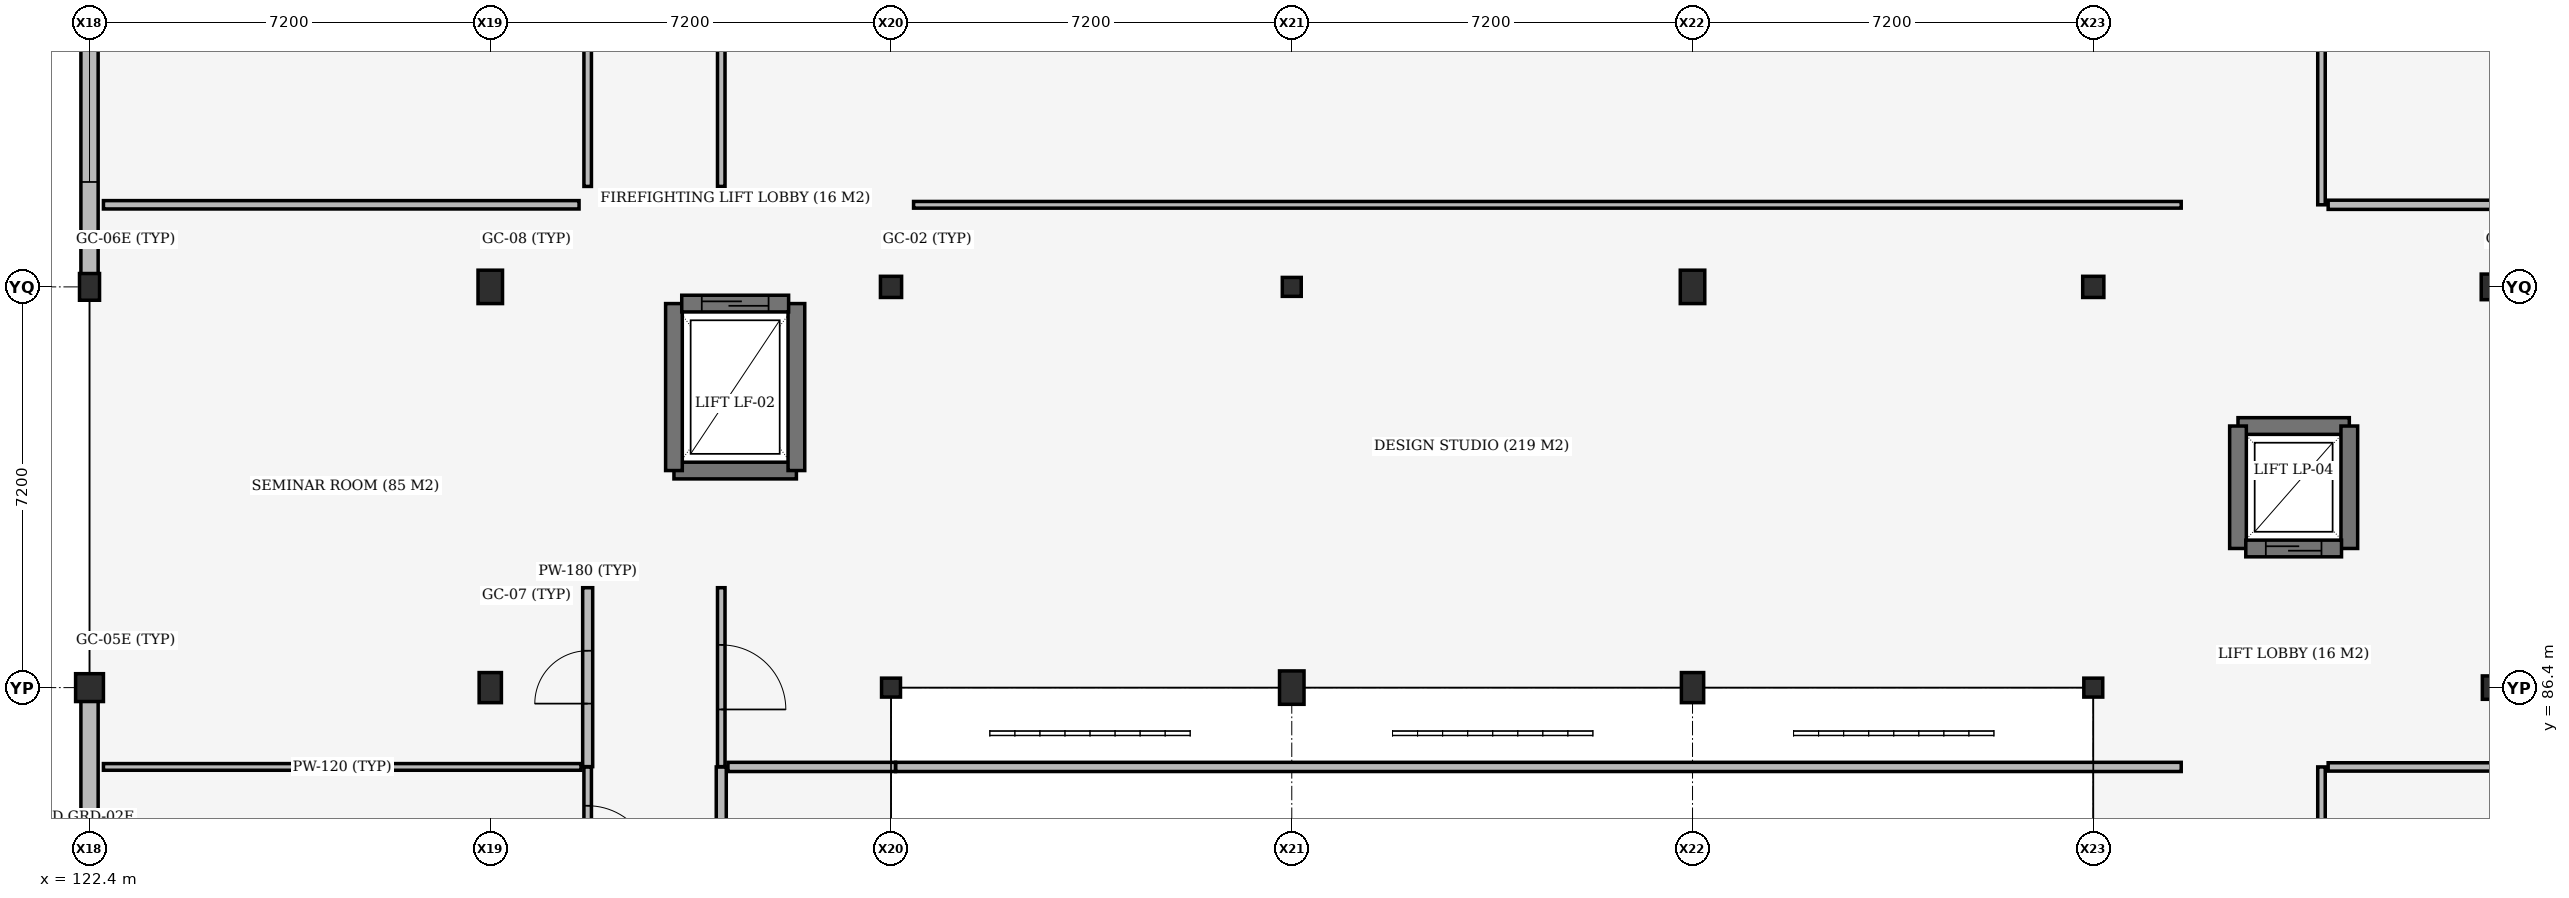
"""IFC4 building model, lengths in metres.
Left out: names, types, materials, properties, quantities, classifications, styles, units other than length and angle.
Written with IfcOpenShell. Run it as: python <this file> out.ifc"""

import sys

from ifc_helpers import new_model, si_unit, direction, frame, frame_2d, origin, origin_2d, place, context, subcontext, project, spatial, rectangle, extrude, element, fill, save


model = new_model("IFC4")
c1 = context("Model", 3, precision=1e-05, world=origin(), true_north=direction((0.0, 1.0)))
c2 = subcontext(c1, "Body", "Model", "MODEL_VIEW")
j1 = project(units=[si_unit("LENGTHUNIT", "METRE"), si_unit("PLANEANGLEUNIT", "RADIAN")], contexts=[c1])
p1 = place(None, origin())
s1 = spatial("IfcSite", under=j1, at=p1, CompositionType="ELEMENT")
p2 = place(p1, origin())
s2 = spatial("IfcBuilding", under=s1, at=p2, CompositionType="ELEMENT")
p3 = place(p2, frame((0.0, 0.0, 9.6)))
s3 = spatial("IfcBuildingStorey", under=s2, at=p3, CompositionType="ELEMENT", Elevation=9.6)
p4 = place(p3, frame((122.4, 86.4, 0.0), z_axis=(0.0, 0.0, 1.0), x_axis=(1.0, 0.0, 0.0)))
e1 = element("IfcColumn", 1, at=p4, inside=s3, PredefinedType="COLUMN", context=c2, shape_type="SweptSolid", body=[
    extrude(rectangle(XDim=0.5, YDim=0.5, at=origin_2d()), origin(), (0.0, 0.0, 1.0), 3.92),
])
p5 = place(p3, frame((122.4, 93.6, 0.0), z_axis=(0.0, 0.0, 1.0), x_axis=(1.0, 0.0, 0.0)))
e2 = element("IfcColumn", 2, at=p5, inside=s3, PredefinedType="COLUMN", context=c2, shape_type="SweptSolid", body=[
    extrude(rectangle(XDim=0.36, YDim=0.48, at=origin_2d()), origin(), (0.0, 0.0, 1.0), 3.92),
])
p6 = place(p3, frame((129.6, 86.4, 0.0), z_axis=(0.0, 0.0, 1.0), x_axis=(1.0, 0.0, 0.0)))
e3 = element("IfcColumn", 3, at=p6, inside=s3, PredefinedType="COLUMN", context=c2, shape_type="SweptSolid", body=[
    extrude(rectangle(XDim=0.4, YDim=0.54, at=origin_2d()), origin(), (0.0, 0.0, 1.0), 3.92),
])
p7 = place(p3, frame((129.6, 93.6, 0.0), z_axis=(0.0, 0.0, 1.0), x_axis=(1.0, 0.0, 0.0)))
e4 = element("IfcColumn", 4, at=p7, inside=s3, PredefinedType="COLUMN", context=c2, shape_type="SweptSolid", body=[
    extrude(rectangle(XDim=0.44, YDim=0.6, at=origin_2d()), origin(), (0.0, 0.0, 1.0), 3.92),
])
p8 = place(p3, frame((136.8, 86.4, 0.0), z_axis=(0.0, 0.0, 1.0), x_axis=(1.0, 0.0, 0.0)))
e5 = element("IfcColumn", 5, at=p8, inside=s3, PredefinedType="COLUMN", context=c2, shape_type="SweptSolid", body=[
    extrude(rectangle(XDim=0.34, YDim=0.34, at=origin_2d()), origin(), (0.0, 0.0, 1.0), 3.92),
])
p9 = place(p3, frame((136.8, 93.6, 0.0), z_axis=(0.0, 0.0, 1.0), x_axis=(1.0, 0.0, 0.0)))
e6 = element("IfcColumn", 6, at=p9, inside=s3, PredefinedType="COLUMN", context=c2, shape_type="SweptSolid", body=[
    extrude(rectangle(XDim=0.38, YDim=0.38, at=origin_2d()), origin(), (0.0, 0.0, 1.0), 3.92),
])
p10 = place(p3, frame((144.0, 86.4, 0.0), z_axis=(0.0, 0.0, 1.0), x_axis=(1.0, 0.0, 0.0)))
e7 = element("IfcColumn", 7, at=p10, inside=s3, PredefinedType="COLUMN", context=c2, shape_type="SweptSolid", body=[
    extrude(rectangle(XDim=0.44, YDim=0.6, at=origin_2d()), origin(), (0.0, 0.0, 1.0), 3.92),
])
p11 = place(p3, frame((144.0, 93.6, 0.0), z_axis=(0.0, 0.0, 1.0), x_axis=(1.0, 0.0, 0.0)))
e8 = element("IfcColumn", 8, at=p11, inside=s3, PredefinedType="COLUMN", context=c2, shape_type="SweptSolid", body=[
    extrude(rectangle(XDim=0.34, YDim=0.34, at=origin_2d()), origin(), (0.0, 0.0, 1.0), 3.92),
])
p12 = place(p3, frame((151.2, 86.4, 0.0), z_axis=(0.0, 0.0, 1.0), x_axis=(1.0, 0.0, 0.0)))
e9 = element("IfcColumn", 9, at=p12, inside=s3, PredefinedType="COLUMN", context=c2, shape_type="SweptSolid", body=[
    extrude(rectangle(XDim=0.4, YDim=0.54, at=origin_2d()), origin(), (0.0, 0.0, 1.0), 3.92),
])
p13 = place(p3, frame((151.2, 93.6, 0.0), z_axis=(0.0, 0.0, 1.0), x_axis=(1.0, 0.0, 0.0)))
e10 = element("IfcColumn", 10, at=p13, inside=s3, PredefinedType="COLUMN", context=c2, shape_type="SweptSolid", body=[
    extrude(rectangle(XDim=0.44, YDim=0.6, at=origin_2d()), origin(), (0.0, 0.0, 1.0), 3.92),
])
p14 = place(p3, frame((158.4, 86.4, 0.0), z_axis=(0.0, 0.0, 1.0), x_axis=(1.0, 0.0, 0.0)))
e11 = element("IfcColumn", 11, at=p14, inside=s3, PredefinedType="COLUMN", context=c2, shape_type="SweptSolid", body=[
    extrude(rectangle(XDim=0.34, YDim=0.34, at=origin_2d()), origin(), (0.0, 0.0, 1.0), 3.92),
])
p15 = place(p3, frame((158.4, 93.6, 0.0), z_axis=(0.0, 0.0, 1.0), x_axis=(1.0, 0.0, 0.0)))
e12 = element("IfcColumn", 12, at=p15, inside=s3, PredefinedType="COLUMN", context=c2, shape_type="SweptSolid", body=[
    extrude(rectangle(XDim=0.38, YDim=0.38, at=origin_2d()), origin(), (0.0, 0.0, 1.0), 3.92),
])
p16 = place(p3, frame((165.6, 86.4, 0.0), z_axis=(0.0, 0.0, 1.0), x_axis=(1.0, 0.0, 0.0)))
e13 = element("IfcColumn", 13, at=p16, inside=s3, PredefinedType="COLUMN", context=c2, shape_type="SweptSolid", body=[
    extrude(rectangle(XDim=0.42, YDim=0.42, at=origin_2d()), origin(), (0.0, 0.0, 1.0), 3.92),
])
p17 = place(p3, frame((165.6, 93.6, 0.0), z_axis=(0.0, 0.0, 1.0), x_axis=(1.0, 0.0, 0.0)))
e14 = element("IfcColumn", 14, at=p17, inside=s3, PredefinedType="COLUMN", context=c2, shape_type="SweptSolid", body=[
    extrude(rectangle(XDim=0.46, YDim=0.46, at=origin_2d()), origin(), (0.0, 0.0, 1.0), 3.92),
])
p18 = place(p3, frame((132.9, 90.3, 0.0), z_axis=(0.0, 0.0, 1.0), x_axis=(1.0, 0.0, 0.0)))
e15 = element("IfcWall", 15, at=p18, inside=s3, PredefinedType="SHEAR", context=c2, shape_type="SweptSolid", body=[
    extrude(rectangle(XDim=2.2, YDim=0.3, at=frame_2d((1.1, 0.0))), origin(), (0.0, 0.0, 1.0), 3.92),
])
for number, where, z_axis, x_axis in (
    (16, (132.9, 93.3, 0.0), (0.0, 0.0, 1.0), (0.0, -1.0, 0.0)),
    (17, (135.1, 90.3, 0.0), (0.0, 0.0, 1.0), (0.0, 1.0, 0.0)),
):
    element("IfcWall", number, at=place(p3, frame(where, z_axis=z_axis, x_axis=x_axis)), inside=s3, PredefinedType="SHEAR", context=c2, shape_type="SweptSolid", body=[
        extrude(rectangle(XDim=3.0, YDim=0.3, at=frame_2d((1.5, 0.0))), origin(), (0.0, 0.0, 1.0), 3.92),
    ])
p19 = place(p3, frame((163.0, 91.1, 0.0), z_axis=(0.0, 0.0, 1.0), x_axis=(-1.0, 0.0, 0.0)))
e18 = element("IfcWall", 18, at=p19, inside=s3, PredefinedType="SHEAR", context=c2, shape_type="SweptSolid", body=[
    extrude(rectangle(XDim=2.0, YDim=0.3, at=frame_2d((1.0, 0.0))), origin(), (0.0, 0.0, 1.0), 3.92),
])
for number, where, z_axis, x_axis in (
    (19, (161.0, 91.1, 0.0), (0.0, 0.0, 1.0), (0.0, -1.0, 0.0)),
    (20, (163.0, 88.9, 0.0), (0.0, 0.0, 1.0), (0.0, 1.0, 0.0)),
):
    element("IfcWall", number, at=place(p3, frame(where, z_axis=z_axis, x_axis=x_axis)), inside=s3, PredefinedType="SHEAR", context=c2, shape_type="SweptSolid", body=[
        extrude(rectangle(XDim=2.2, YDim=0.3, at=frame_2d((1.1, 0.0))), origin(), (0.0, 0.0, 1.0), 3.92),
    ])
p20 = place(p3, frame((122.4, 83.022, 0.0), z_axis=(0.0, 0.0, 1.0), x_axis=(0.0, 1.0, 0.0)))
e21 = element("IfcWall", 21, at=p20, inside=s3, PredefinedType="STANDARD", context=c2, shape_type="SweptSolid", body=[
    extrude(rectangle(XDim=3.136, YDim=0.31, at=frame_2d((1.568, 0.0))), origin(), (0.0, 0.0, 1.0), 3.4),
])
p21 = place(p3, frame((122.4, 93.832, 0.0), z_axis=(0.0, 0.0, 1.0), x_axis=(0.0, 1.0, 0.0)))
e22 = element("IfcWall", 22, at=p21, inside=s3, PredefinedType="STANDARD", context=c2, shape_type="SweptSolid", body=[
    extrude(rectangle(XDim=6.706, YDim=0.31, at=frame_2d((3.353, 0.0))), origin(), (0.0, 0.0, 1.0), 3.28),
])
p22 = place(p21, frame((1.653, 0.0, 0.9)))
e23 = element("IfcOpeningElement", 23, at=p22, cuts=e22, PredefinedType="OPENING", context=c2, shape_type="SweptSolid", body=[
    extrude(rectangle(XDim=3.4, YDim=1.5, at=frame_2d((1.7, 0.75))), frame((0.0, 0.165, 0.0), z_axis=(0.0, -1.0, 0.0), x_axis=(1.0, 0.0, 0.0)), (0.0, 0.0, 1.0), 0.33),
])
p23 = place(p3, frame((133.04, 93.3, 0.0), z_axis=(0.0, 0.0, 1.0), x_axis=(1.0, 0.0, 0.0)))
e24 = element("IfcWall", 24, at=p23, inside=s3, PredefinedType="SHEAR", context=c2, shape_type="SweptSolid", body=[
    extrude(rectangle(XDim=1.92, YDim=0.3, at=frame_2d((0.96, 0.0))), origin(), (0.0, 0.0, 1.0), 3.92),
])
p24 = place(p23, frame((0.36, 0.0, 0.0)))
e25 = element("IfcOpeningElement", 25, at=p24, cuts=e24, PredefinedType="OPENING", context=c2, shape_type="SweptSolid", body=[
    extrude(rectangle(XDim=1.2, YDim=2.1, at=frame_2d((0.6, 1.05))), frame((0.0, 0.16, 0.0), z_axis=(0.0, -1.0, 0.0), x_axis=(1.0, 0.0, 0.0)), (0.0, 0.0, 1.0), 0.32),
])
p25 = place(p3, frame((162.86, 88.9, 0.0), z_axis=(0.0, 0.0, 1.0), x_axis=(-1.0, 0.0, 0.0)))
e26 = element("IfcWall", 26, at=p25, inside=s3, PredefinedType="SHEAR", context=c2, shape_type="SweptSolid", body=[
    extrude(rectangle(XDim=1.72, YDim=0.3, at=frame_2d((0.86, 0.0))), origin(), (0.0, 0.0, 1.0), 3.92),
])
p26 = place(p25, frame((0.36, 0.0, 0.0)))
e27 = element("IfcOpeningElement", 27, at=p26, cuts=e26, PredefinedType="OPENING", context=c2, shape_type="SweptSolid", body=[
    extrude(rectangle(XDim=1.0, YDim=2.1, at=frame_2d((0.5, 1.05))), frame((0.0, 0.16, 0.0), z_axis=(0.0, -1.0, 0.0), x_axis=(1.0, 0.0, 0.0)), (0.0, 0.0, 1.0), 0.32),
])
p27 = place(p3, frame((131.35, 82.42, 0.0), z_axis=(0.0, 0.0, 1.0), x_axis=(0.0, 1.0, 0.0)))
e28 = element("IfcWall", 28, at=p27, inside=s3, PredefinedType="PARTITIONING", context=c2, shape_type="SweptSolid", body=[
    extrude(rectangle(XDim=2.555, YDim=0.135, at=frame_2d((1.278, 0.0))), origin(), (0.0, 0.0, 1.0), 3.34),
])
p28 = place(p27, frame((0.698, 0.0, 0.0)))
e29 = element("IfcOpeningElement", 29, at=p28, cuts=e28, PredefinedType="OPENING", context=c2, shape_type="SweptSolid", body=[
    extrude(rectangle(XDim=1.16, YDim=2.2, at=frame_2d((0.58, 1.1))), frame((0.0, 0.077, 0.0), z_axis=(0.0, -1.0, 0.0), x_axis=(1.0, 0.0, 0.0)), (0.0, 0.0, 1.0), 0.155),
])
p29 = place(p3, frame((122.65, 84.975, 0.0), z_axis=(0.0, 0.0, 1.0), x_axis=(1.0, 0.0, 0.0)))
e30 = element("IfcWall", 30, at=p29, inside=s3, PredefinedType="PARTITIONING", context=c2, shape_type="SweptSolid", body=[
    extrude(rectangle(XDim=8.58, YDim=0.12, at=frame_2d((4.29, 0.0))), origin(), (0.0, 0.0, 1.0), 3.28),
])
p30 = place(p3, frame((131.35, 84.98, 0.0), z_axis=(0.0, 0.0, 1.0), x_axis=(0.0, 1.0, 0.0)))
e31 = element("IfcWall", 31, at=p30, inside=s3, PredefinedType="PARTITIONING", context=c2, shape_type="SweptSolid", body=[
    extrude(rectangle(XDim=3.215, YDim=0.18, at=frame_2d((1.607, 0.0))), origin(), (0.0, 0.0, 1.0), 3.4),
])
p31 = place(p30, frame((1.133, 0.0, 0.0)))
e32 = element("IfcOpeningElement", 32, at=p31, cuts=e31, PredefinedType="OPENING", context=c2, shape_type="SweptSolid", body=[
    extrude(rectangle(XDim=0.95, YDim=2.15, at=frame_2d((0.475, 1.075))), frame((0.0, 0.1, 0.0), z_axis=(0.0, -1.0, 0.0), x_axis=(1.0, 0.0, 0.0)), (0.0, 0.0, 1.0), 0.2),
])
p32 = place(p3, frame((122.65, 95.075, 0.0), z_axis=(0.0, 0.0, 1.0), x_axis=(1.0, 0.0, 0.0)))
e33 = element("IfcWall", 33, at=p32, inside=s3, PredefinedType="PARTITIONING", context=c2, shape_type="SweptSolid", body=[
    extrude(rectangle(XDim=8.545, YDim=0.15, at=frame_2d((4.272, 0.0))), origin(), (0.0, 0.0, 1.0), 3.18),
])
p33 = place(p3, frame((131.35, 95.405, 0.0), z_axis=(0.0, 0.0, 1.0), x_axis=(0.0, 1.0, 0.0)))
e34 = element("IfcWall", 34, at=p33, inside=s3, PredefinedType="PARTITIONING", context=c2, shape_type="SweptSolid", body=[
    extrude(rectangle(XDim=12.295, YDim=0.135, at=frame_2d((6.147, 0.0))), origin(), (0.0, 0.0, 1.0), 3.18),
])
p34 = place(p33, frame((5.567, 0.0, 0.0)))
e35 = element("IfcOpeningElement", 35, at=p34, cuts=e34, PredefinedType="OPENING", context=c2, shape_type="SweptSolid", body=[
    extrude(rectangle(XDim=1.16, YDim=2.2, at=frame_2d((0.58, 1.1))), frame((0.0, 0.077, 0.0), z_axis=(0.0, -1.0, 0.0), x_axis=(1.0, 0.0, 0.0)), (0.0, 0.0, 1.0), 0.155),
])
p35 = place(p3, frame((133.75, 74.055, 0.0), z_axis=(0.0, 0.0, 1.0), x_axis=(0.0, 1.0, 0.0)))
e36 = element("IfcWall", 36, at=p35, inside=s3, PredefinedType="PARTITIONING", context=c2, shape_type="SweptSolid", body=[
    extrude(rectangle(XDim=10.92, YDim=0.18, at=frame_2d((5.46, 0.0))), origin(), (0.0, 0.0, 1.0), 3.28),
])
p36 = place(p35, frame((4.985, 0.0, 0.0)))
e37 = element("IfcOpeningElement", 37, at=p36, cuts=e36, PredefinedType="OPENING", context=c2, shape_type="SweptSolid", body=[
    extrude(rectangle(XDim=0.95, YDim=2.15, at=frame_2d((0.475, 1.075))), frame((0.0, 0.1, 0.0), z_axis=(0.0, -1.0, 0.0), x_axis=(1.0, 0.0, 0.0)), (0.0, 0.0, 1.0), 0.2),
])
p37 = place(p3, frame((133.87, 84.975, 0.0), z_axis=(0.0, 0.0, 1.0), x_axis=(1.0, 0.0, 0.0)))
e38 = element("IfcWall", 38, at=p37, inside=s3, PredefinedType="PARTITIONING", context=c2, shape_type="SweptSolid", body=[
    extrude(rectangle(XDim=3.01, YDim=0.165, at=frame_2d((1.505, 0.0))), origin(), (0.0, 0.0, 1.0), 3.4),
])
p38 = place(p3, frame((133.75, 84.98, 0.0), z_axis=(0.0, 0.0, 1.0), x_axis=(0.0, 1.0, 0.0)))
e39 = element("IfcWall", 39, at=p38, inside=s3, PredefinedType="PARTITIONING", context=c2, shape_type="SweptSolid", body=[
    extrude(rectangle(XDim=3.215, YDim=0.135, at=frame_2d((1.607, 0.0))), origin(), (0.0, 0.0, 1.0), 3.4),
])
p39 = place(p38, frame((1.028, 0.0, 0.0)))
e40 = element("IfcOpeningElement", 40, at=p39, cuts=e39, PredefinedType="OPENING", context=c2, shape_type="SweptSolid", body=[
    extrude(rectangle(XDim=1.16, YDim=2.2, at=frame_2d((0.58, 1.1))), frame((0.0, 0.077, 0.0), z_axis=(0.0, -1.0, 0.0), x_axis=(1.0, 0.0, 0.0)), (0.0, 0.0, 1.0), 0.155),
])
p40 = place(p3, frame((136.885, 84.975, 0.0), z_axis=(0.0, 0.0, 1.0), x_axis=(1.0, 0.0, 0.0)))
e41 = element("IfcWall", 41, at=p40, inside=s3, PredefinedType="PARTITIONING", context=c2, shape_type="SweptSolid", body=[
    extrude(rectangle(XDim=23.095, YDim=0.165, at=frame_2d((11.547, 0.0))), origin(), (0.0, 0.0, 1.0), 3.34),
])
p41 = place(p3, frame((137.205, 95.075, 0.0), z_axis=(0.0, 0.0, 1.0), x_axis=(1.0, 0.0, 0.0)))
e42 = element("IfcWall", 42, at=p41, inside=s3, PredefinedType="PARTITIONING", context=c2, shape_type="SweptSolid", body=[
    extrude(rectangle(XDim=22.775, YDim=0.12, at=frame_2d((11.387, 0.0))), origin(), (0.0, 0.0, 1.0), 3.24),
])
p42 = place(p3, frame((133.75, 95.405, 0.0), z_axis=(0.0, 0.0, 1.0), x_axis=(0.0, 1.0, 0.0)))
e43 = element("IfcWall", 43, at=p42, inside=s3, PredefinedType="PARTITIONING", context=c2, shape_type="SweptSolid", body=[
    extrude(rectangle(XDim=12.295, YDim=0.135, at=frame_2d((6.147, 0.0))), origin(), (0.0, 0.0, 1.0), 3.18),
])
p43 = place(p42, frame((5.573, 0.0, 0.0)))
e44 = element("IfcOpeningElement", 44, at=p43, cuts=e43, PredefinedType="OPENING", context=c2, shape_type="SweptSolid", body=[
    extrude(rectangle(XDim=1.15, YDim=2.2, at=frame_2d((0.575, 1.1))), frame((0.0, 0.077, 0.0), z_axis=(0.0, -1.0, 0.0), x_axis=(1.0, 0.0, 0.0)), (0.0, 0.0, 1.0), 0.155),
])
p44 = place(p3, frame((162.5, 74.055, 0.0), z_axis=(0.0, 0.0, 1.0), x_axis=(0.0, 1.0, 0.0)))
e45 = element("IfcWall", 45, at=p44, inside=s3, PredefinedType="PARTITIONING", context=c2, shape_type="SweptSolid", body=[
    extrude(rectangle(XDim=10.92, YDim=0.135, at=frame_2d((5.46, 0.0))), origin(), (0.0, 0.0, 1.0), 3.24),
])
p45 = place(p44, frame((4.88, 0.0, 0.0)))
e46 = element("IfcOpeningElement", 46, at=p45, cuts=e45, PredefinedType="OPENING", context=c2, shape_type="SweptSolid", body=[
    extrude(rectangle(XDim=1.16, YDim=2.2, at=frame_2d((0.58, 1.1))), frame((0.0, 0.077, 0.0), z_axis=(0.0, -1.0, 0.0), x_axis=(1.0, 0.0, 0.0)), (0.0, 0.0, 1.0), 0.155),
])
p46 = place(p3, frame((162.62, 84.975, 0.0), z_axis=(0.0, 0.0, 1.0), x_axis=(1.0, 0.0, 0.0)))
e47 = element("IfcWall", 47, at=p46, inside=s3, PredefinedType="PARTITIONING", context=c2, shape_type="SweptSolid", body=[
    extrude(rectangle(XDim=9.93, YDim=0.15, at=frame_2d((4.965, 0.0))), origin(), (0.0, 0.0, 1.0), 3.24),
])
p47 = place(p3, frame((162.62, 95.075, 0.0), z_axis=(0.0, 0.0, 1.0), x_axis=(1.0, 0.0, 0.0)))
e48 = element("IfcWall", 48, at=p47, inside=s3, PredefinedType="PARTITIONING", context=c2, shape_type="SweptSolid", body=[
    extrude(rectangle(XDim=9.93, YDim=0.165, at=frame_2d((4.965, 0.0))), origin(), (0.0, 0.0, 1.0), 3.4),
])
p48 = place(p3, frame((162.5, 95.075, 0.0), z_axis=(0.0, 0.0, 1.0), x_axis=(0.0, 1.0, 0.0)))
e49 = element("IfcWall", 49, at=p48, inside=s3, PredefinedType="PARTITIONING", context=c2, shape_type="SweptSolid", body=[
    extrude(rectangle(XDim=12.625, YDim=0.135, at=frame_2d((6.312, 0.0))), origin(), (0.0, 0.0, 1.0), 3.24),
])
p49 = place(p48, frame((5.732, 0.0, 0.0)))
e50 = element("IfcOpeningElement", 50, at=p49, cuts=e49, PredefinedType="OPENING", context=c2, shape_type="SweptSolid", body=[
    extrude(rectangle(XDim=1.16, YDim=2.2, at=frame_2d((0.58, 1.1))), frame((0.0, 0.077, 0.0), z_axis=(0.0, -1.0, 0.0), x_axis=(1.0, 0.0, 0.0)), (0.0, 0.0, 1.0), 0.155),
])
p50 = place(p22, origin())
e51 = element("IfcWindow", 51, at=p50, inside=s3, PartitioningType="DOUBLE_PANEL_VERTICAL", PredefinedType="WINDOW", context=c2, shape_type="SweptSolid", body=[
    extrude(rectangle(XDim=3.4, YDim=1.5, at=frame_2d((1.7, 0.75))), frame((0.0, 0.03, 0.0), z_axis=(0.0, -1.0, 0.0), x_axis=(1.0, 0.0, 0.0)), (0.0, 0.0, 1.0), 0.06),
])
fill(e23, e51)
p51 = place(p24, origin())
e52 = element("IfcDoor", 52, at=p51, inside=s3, OperationType="SLIDING_TO_LEFT", PredefinedType="DOOR", context=c2, shape_type="SweptSolid", body=[
    extrude(rectangle(XDim=1.2, YDim=2.1, at=frame_2d((0.6, 1.05))), frame((0.0, 0.025, 0.0), z_axis=(0.0, -1.0, 0.0), x_axis=(1.0, 0.0, 0.0)), (0.0, 0.0, 1.0), 0.05),
])
fill(e25, e52)
p52 = place(p26, origin())
e53 = element("IfcDoor", 53, at=p52, inside=s3, OperationType="SLIDING_TO_LEFT", PredefinedType="DOOR", context=c2, shape_type="SweptSolid", body=[
    extrude(rectangle(XDim=1.0, YDim=2.1, at=frame_2d((0.5, 1.05))), frame((0.0, 0.025, 0.0), z_axis=(0.0, -1.0, 0.0), x_axis=(1.0, 0.0, 0.0)), (0.0, 0.0, 1.0), 0.05),
])
fill(e27, e53)
p53 = place(p28, origin())
e54 = element("IfcDoor", 54, at=p53, inside=s3, OperationType="SINGLE_SWING_RIGHT", PredefinedType="DOOR", context=c2, shape_type="SweptSolid", body=[
    extrude(rectangle(XDim=1.16, YDim=2.2, at=frame_2d((0.58, 1.1))), frame((0.0, 0.025, 0.0), z_axis=(0.0, -1.0, 0.0), x_axis=(1.0, 0.0, 0.0)), (0.0, 0.0, 1.0), 0.05),
])
fill(e29, e54)
p54 = place(p31, origin())
e55 = element("IfcDoor", 55, at=p54, inside=s3, OperationType="SINGLE_SWING_LEFT", PredefinedType="DOOR", context=c2, shape_type="SweptSolid", body=[
    extrude(rectangle(XDim=0.95, YDim=2.15, at=frame_2d((0.475, 1.075))), frame((0.0, 0.025, 0.0), z_axis=(0.0, -1.0, 0.0), x_axis=(1.0, 0.0, 0.0)), (0.0, 0.0, 1.0), 0.05),
])
fill(e32, e55)
p55 = place(p39, origin())
e56 = element("IfcDoor", 56, at=p55, inside=s3, OperationType="SINGLE_SWING_RIGHT", PredefinedType="DOOR", context=c2, shape_type="SweptSolid", body=[
    extrude(rectangle(XDim=1.16, YDim=2.2, at=frame_2d((0.58, 1.1))), frame((0.0, 0.025, 0.0), z_axis=(0.0, -1.0, 0.0), x_axis=(1.0, 0.0, 0.0)), (0.0, 0.0, 1.0), 0.05),
])
fill(e40, e56)
save(model, sys.argv[1])
